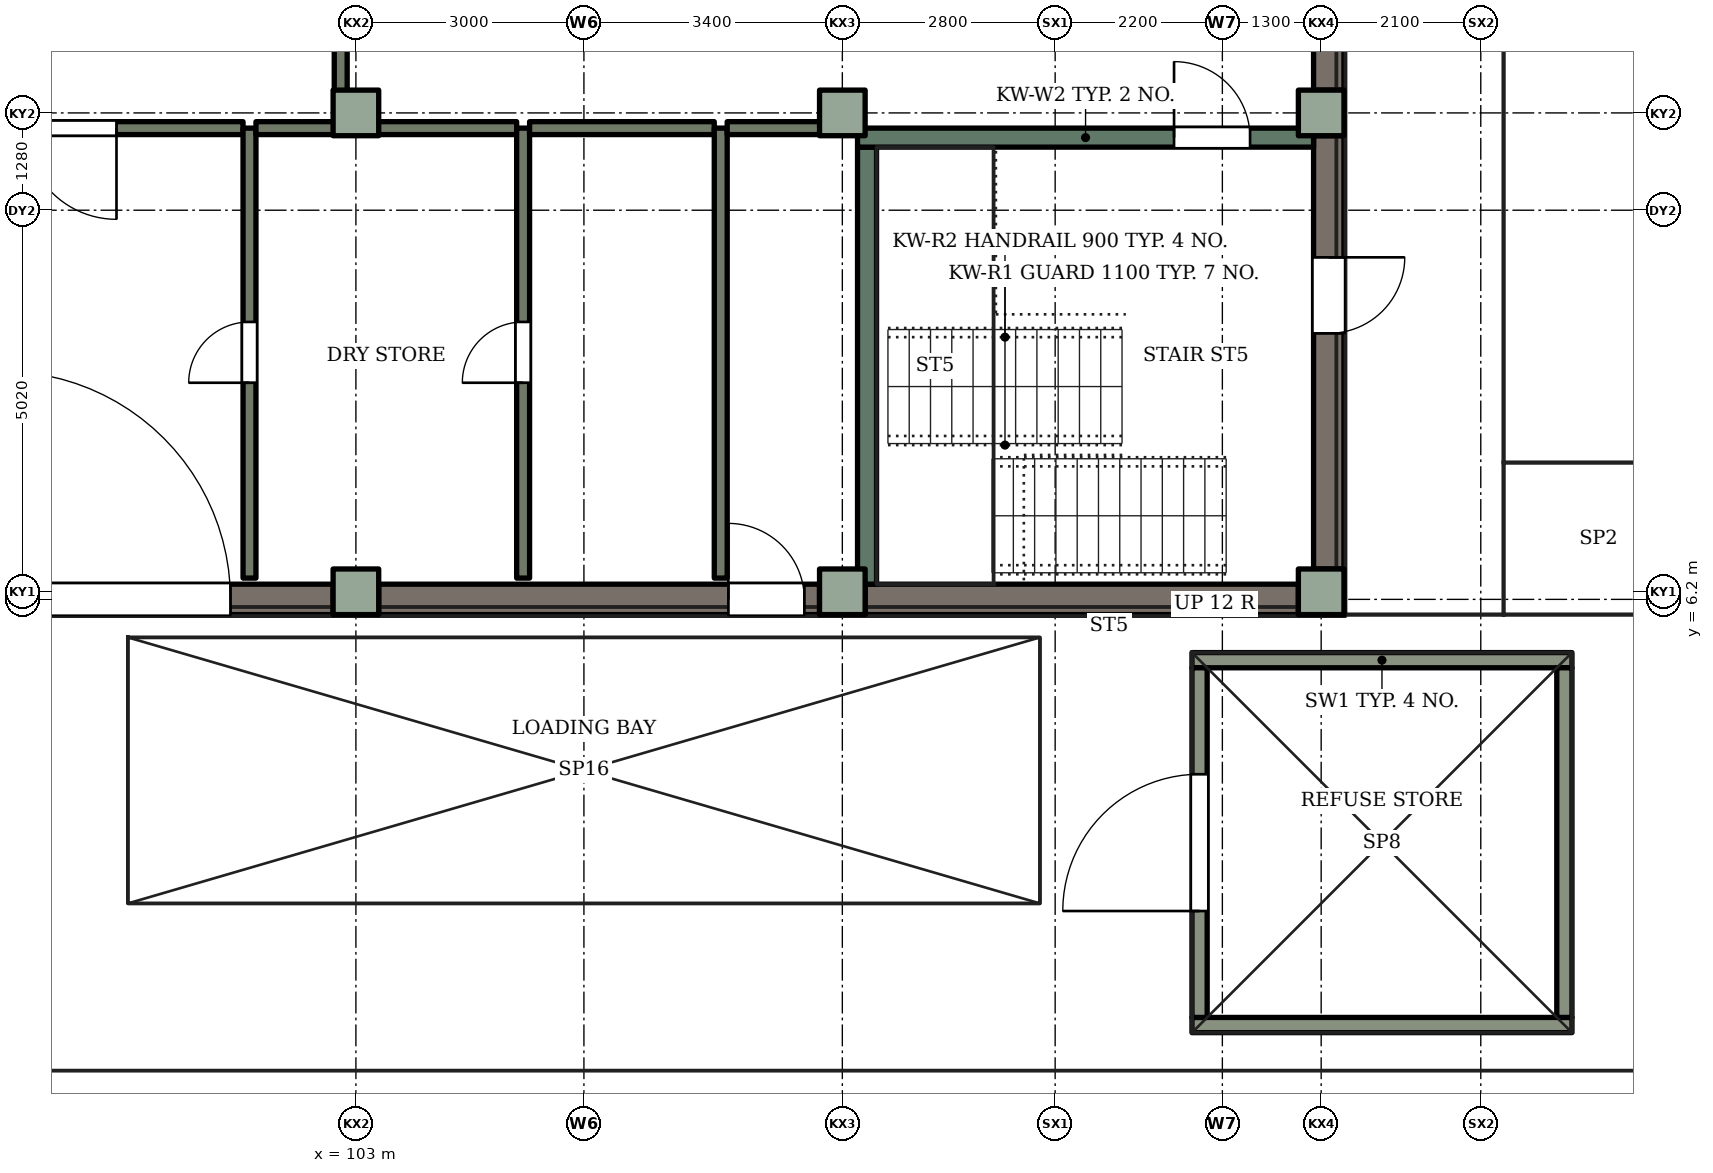
"""IFC4 building model, lengths in metres.
Left out: names, types, materials, properties, quantities, classifications, styles, units other than length and angle.
Written with IfcOpenShell. Run it as: python <this file> out.ifc"""

import sys

from ifc_helpers import new_model, si_unit, direction, frame, frame_2d, origin, origin_2d, place, context, subcontext, project, spatial, rectangle, extrude, element, fill, save


model = new_model("IFC4")
c1 = context("Model", 3, precision=1e-05, world=origin(), true_north=direction((0.0, 1.0)))
c2 = subcontext(c1, "Body", "Model", "MODEL_VIEW")
j1 = project(units=[si_unit("LENGTHUNIT", "METRE"), si_unit("PLANEANGLEUNIT", "RADIAN")], contexts=[c1])
p1 = place(None, origin())
s1 = spatial("IfcSite", under=j1, at=p1, CompositionType="ELEMENT")
p2 = place(p1, origin())
s2 = spatial("IfcBuilding", under=s1, at=p2, CompositionType="ELEMENT")
p3 = place(p2, origin())
s3 = spatial("IfcBuildingStorey", under=s2, at=p3, CompositionType="ELEMENT", Elevation=0.0)
for number, where, z_axis, x_axis in (
    (1, (103.0, 6.3, 0.0), (0.0, 0.0, 1.0), (1.0, 0.0, 0.0)),
    (2, (103.0, 12.6, 0.0), (0.0, 0.0, 1.0), (1.0, 0.0, 0.0)),
    (3, (109.4, 6.3, 0.0), (0.0, 0.0, 1.0), (1.0, 0.0, 0.0)),
    (4, (109.4, 12.6, 0.0), (0.0, 0.0, 1.0), (1.0, 0.0, 0.0)),
    (5, (115.7, 6.3, 0.0), (0.0, 0.0, 1.0), (1.0, 0.0, 0.0)),
    (6, (115.7, 12.6, 0.0), (0.0, 0.0, 1.0), (1.0, 0.0, 0.0)),
):
    element("IfcColumn", number, at=place(p3, frame(where, z_axis=z_axis, x_axis=x_axis)), inside=s3, PredefinedType="COLUMN", context=c2, shape_type="SweptSolid", body=[
        extrude(rectangle(XDim=0.6, YDim=0.6, at=origin_2d()), origin(), (0.0, 0.0, 1.0), 4.2),
    ])
p4 = place(p3, frame((97.0, 6.2, 0.0), z_axis=(0.0, 0.0, 1.0), x_axis=(1.0, 0.0, 0.0)))
e7 = element("IfcWall", 7, at=p4, inside=s3, PredefinedType="SOLIDWALL", context=c2, shape_type="SweptSolid", body=[
    extrude(rectangle(XDim=5.7, YDim=0.4, at=frame_2d((2.85, 0.0))), origin(), (0.0, 0.0, 1.0), 4.2),
])
p5 = place(p4, frame((1.35, 0.0, 0.0)))
e8 = element("IfcOpeningElement", 8, at=p5, cuts=e7, PredefinedType="OPENING", context=c2, shape_type="SweptSolid", body=[
    extrude(rectangle(XDim=3.0, YDim=3.0, at=frame_2d((1.5, 1.5))), frame((0.0, 0.21, 0.0), z_axis=(0.0, -1.0, 0.0), x_axis=(1.0, 0.0, 0.0)), (0.0, 0.0, 1.0), 0.42),
])
p6 = place(p3, frame((103.3, 6.2, 0.0), z_axis=(0.0, 0.0, 1.0), x_axis=(1.0, 0.0, 0.0)))
e9 = element("IfcWall", 9, at=p6, inside=s3, PredefinedType="SOLIDWALL", context=c2, shape_type="SweptSolid", body=[
    extrude(rectangle(XDim=5.8, YDim=0.4, at=frame_2d((2.9, 0.0))), origin(), (0.0, 0.0, 1.0), 4.2),
])
p7 = place(p6, frame((4.6, 0.0, 0.0)))
e10 = element("IfcOpeningElement", 10, at=p7, cuts=e9, PredefinedType="OPENING", context=c2, shape_type="SweptSolid", body=[
    extrude(rectangle(XDim=1.0, YDim=2.1, at=frame_2d((0.5, 1.05))), frame((0.0, 0.21, 0.0), z_axis=(0.0, -1.0, 0.0), x_axis=(1.0, 0.0, 0.0)), (0.0, 0.0, 1.0), 0.42),
])
p8 = place(p3, frame((109.7, 6.2, 0.0), z_axis=(0.0, 0.0, 1.0), x_axis=(1.0, 0.0, 0.0)))
e11 = element("IfcWall", 11, at=p8, inside=s3, PredefinedType="SOLIDWALL", context=c2, shape_type="SweptSolid", body=[
    extrude(rectangle(XDim=5.7, YDim=0.4, at=frame_2d((2.85, 0.0))), origin(), (0.0, 0.0, 1.0), 4.2),
])
p9 = place(p3, frame((115.8, 12.3, 0.0), z_axis=(0.0, 0.0, 1.0), x_axis=(0.0, -1.0, 0.0)))
e12 = element("IfcWall", 12, at=p9, inside=s3, PredefinedType="SOLIDWALL", context=c2, shape_type="SweptSolid", body=[
    extrude(rectangle(XDim=5.7, YDim=0.4, at=frame_2d((2.85, 0.0))), origin(), (0.0, 0.0, 1.0), 4.2),
])
p10 = place(p9, frame((1.6, 0.0, 0.0)))
e13 = element("IfcOpeningElement", 13, at=p10, cuts=e12, PredefinedType="OPENING", context=c2, shape_type="SweptSolid", body=[
    extrude(rectangle(XDim=1.0, YDim=2.4, at=frame_2d((0.5, 1.2))), frame((0.0, 0.21, 0.0), z_axis=(0.0, -1.0, 0.0), x_axis=(1.0, 0.0, 0.0)), (0.0, 0.0, 1.0), 0.42),
])
p11 = place(p3, frame((115.8, 18.7, 0.0), z_axis=(0.0, 0.0, 1.0), x_axis=(0.0, -1.0, 0.0)))
e14 = element("IfcWall", 14, at=p11, inside=s3, PredefinedType="SOLIDWALL", context=c2, shape_type="SweptSolid", body=[
    extrude(rectangle(XDim=5.8, YDim=0.4, at=frame_2d((2.9, 0.0))), origin(), (0.0, 0.0, 1.0), 4.2),
])
p12 = place(p11, frame((1.7, 0.0, 1.5)))
e15 = element("IfcOpeningElement", 15, at=p12, cuts=e14, PredefinedType="OPENING", context=c2, shape_type="SweptSolid", body=[
    extrude(rectangle(XDim=2.4, YDim=1.2, at=frame_2d((1.2, 0.6))), frame((0.0, 0.21, 0.0), z_axis=(0.0, -1.0, 0.0), x_axis=(1.0, 0.0, 0.0)), (0.0, 0.0, 1.0), 0.42),
])
p13 = place(p3, frame((109.725, 6.4, 0.0), z_axis=(0.0, 0.0, 1.0), x_axis=(0.0, 1.0, 0.0)))
e16 = element("IfcWall", 16, at=p13, inside=s3, PredefinedType="SHEAR", context=c2, shape_type="SweptSolid", body=[
    extrude(rectangle(XDim=5.75, YDim=0.25, at=frame_2d((2.875, 0.0))), origin(), (0.0, 0.0, 1.0), 4.2),
])
p14 = place(p3, frame((109.6, 12.275, 0.0), z_axis=(0.0, 0.0, 1.0), x_axis=(1.0, 0.0, 0.0)))
e17 = element("IfcWall", 17, at=p14, inside=s3, PredefinedType="SHEAR", context=c2, shape_type="SweptSolid", body=[
    extrude(rectangle(XDim=6.0, YDim=0.25, at=frame_2d((3.0, 0.0))), origin(), (0.0, 0.0, 1.0), 4.2),
])
p15 = place(p14, frame((4.164, 0.0, 0.0)))
e18 = element("IfcOpeningElement", 18, at=p15, cuts=e17, PredefinedType="OPENING", context=c2, shape_type="SweptSolid", body=[
    extrude(rectangle(XDim=1.0, YDim=2.1, at=frame_2d((0.5, 1.05))), frame((0.0, 0.135, 0.0), z_axis=(0.0, -1.0, 0.0), x_axis=(1.0, 0.0, 0.0)), (0.0, 0.0, 1.0), 0.27),
])
for number, where, z_axis, x_axis in (
    (19, (114.0, 0.6, 0.0), (0.0, 0.0, 1.0), (1.0, 0.0, 0.0)),
    (20, (114.0, 5.4, 0.0), (0.0, 0.0, 1.0), (1.0, 0.0, 0.0)),
):
    element("IfcWall", number, at=place(p3, frame(where, z_axis=z_axis, x_axis=x_axis)), inside=s3, PredefinedType="SOLIDWALL", context=c2, shape_type="SweptSolid", body=[
        extrude(rectangle(XDim=5.0, YDim=0.2, at=frame_2d((2.5, 0.0))), origin(), (0.0, 0.0, 1.0), 2.4),
    ])
p16 = place(p3, frame((114.1, 0.7, 0.0), z_axis=(0.0, 0.0, 1.0), x_axis=(0.0, 1.0, 0.0)))
e21 = element("IfcWall", 21, at=p16, inside=s3, PredefinedType="SOLIDWALL", context=c2, shape_type="SweptSolid", body=[
    extrude(rectangle(XDim=4.6, YDim=0.2, at=frame_2d((2.3, 0.0))), origin(), (0.0, 0.0, 1.0), 2.4),
])
p17 = place(p16, frame((1.4, 0.0, 0.0)))
e22 = element("IfcOpeningElement", 22, at=p17, cuts=e21, PredefinedType="OPENING", context=c2, shape_type="SweptSolid", body=[
    extrude(rectangle(XDim=1.8, YDim=2.1, at=frame_2d((0.9, 1.05))), frame((0.0, 0.11, 0.0), z_axis=(0.0, -1.0, 0.0), x_axis=(1.0, 0.0, 0.0)), (0.0, 0.0, 1.0), 0.22),
])
p18 = place(p3, frame((118.9, 0.7, 0.0), z_axis=(0.0, 0.0, 1.0), x_axis=(0.0, 1.0, 0.0)))
e23 = element("IfcWall", 23, at=p18, inside=s3, PredefinedType="SOLIDWALL", context=c2, shape_type="SweptSolid", body=[
    extrude(rectangle(XDim=4.6, YDim=0.2, at=frame_2d((2.3, 0.0))), origin(), (0.0, 0.0, 1.0), 2.4),
])
p19 = place(p3, frame((101.515, 12.4, 0.0), z_axis=(0.0, 0.0, 1.0), x_axis=(-1.0, 0.0, 0.0)))
e24 = element("IfcWall", 24, at=p19, inside=s3, PredefinedType="PARTITIONING", context=c2, shape_type="SweptSolid", body=[
    extrude(rectangle(XDim=4.63, YDim=0.17, at=frame_2d((2.315, 0.0))), origin(), (0.0, 0.0, 1.0), 3.92),
])
p20 = place(p19, frame((1.665, 0.0, 0.0)))
e25 = element("IfcOpeningElement", 25, at=p20, cuts=e24, PredefinedType="OPENING", context=c2, shape_type="SweptSolid", body=[
    extrude(rectangle(XDim=1.2, YDim=2.1, at=frame_2d((0.6, 1.05))), frame((0.0, 0.095, 0.0), z_axis=(0.0, -1.0, 0.0), x_axis=(1.0, 0.0, 0.0)), (0.0, 0.0, 1.0), 0.19),
])
p21 = place(p3, frame((101.6, 6.48, 0.0), z_axis=(0.0, 0.0, 1.0), x_axis=(0.0, 1.0, 0.0)))
e26 = element("IfcWall", 26, at=p21, inside=s3, PredefinedType="PARTITIONING", context=c2, shape_type="SweptSolid", body=[
    extrude(rectangle(XDim=5.92, YDim=0.17, at=frame_2d((2.96, 0.0))), origin(), (0.0, 0.0, 1.0), 3.92),
])
p22 = place(p21, frame((2.57, 0.0, 0.0)))
e27 = element("IfcOpeningElement", 27, at=p22, cuts=e26, PredefinedType="OPENING", context=c2, shape_type="SweptSolid", body=[
    extrude(rectangle(XDim=0.8, YDim=2.1, at=frame_2d((0.4, 1.05))), frame((0.0, 0.095, 0.0), z_axis=(0.0, -1.0, 0.0), x_axis=(1.0, 0.0, 0.0)), (0.0, 0.0, 1.0), 0.19),
])
p23 = place(p3, frame((102.78, 6.4, 0.0), z_axis=(0.0, 0.0, 1.0), x_axis=(1.0, 0.0, 0.0)))
e28 = element("IfcWall", 28, at=p23, inside=s3, PredefinedType="PARTITIONING", context=c2, shape_type="SweptSolid", body=[
    extrude(rectangle(XDim=0.44, YDim=0.17, at=frame_2d((0.22, 0.0))), origin(), (0.0, 0.0, 1.0), 3.92),
])
p24 = place(p3, frame((102.8, 12.4, 0.0), z_axis=(0.0, 0.0, 1.0), x_axis=(-1.0, 0.0, 0.0)))
e29 = element("IfcWall", 29, at=p24, inside=s3, PredefinedType="PARTITIONING", context=c2, shape_type="SweptSolid", body=[
    extrude(rectangle(XDim=1.115, YDim=0.17, at=frame_2d((0.558, 0.0))), origin(), (0.0, 0.0, 1.0), 3.92),
])
p25 = place(p3, frame((102.8, 12.485, 0.0), z_axis=(0.0, 0.0, 1.0), x_axis=(0.0, 1.0, 0.0)))
e30 = element("IfcWall", 30, at=p25, inside=s3, PredefinedType="PARTITIONING", context=c2, shape_type="SweptSolid", body=[
    extrude(rectangle(XDim=8.915, YDim=0.17, at=frame_2d((4.458, 0.0))), origin(), (0.0, 0.0, 1.0), 3.92),
])
p26 = place(p25, frame((3.865, 0.0, 0.0)))
e31 = element("IfcOpeningElement", 31, at=p26, cuts=e30, PredefinedType="OPENING", context=c2, shape_type="SweptSolid", body=[
    extrude(rectangle(XDim=1.2, YDim=2.1, at=frame_2d((0.6, 1.05))), frame((0.0, 0.095, 0.0), z_axis=(0.0, -1.0, 0.0), x_axis=(1.0, 0.0, 0.0)), (0.0, 0.0, 1.0), 0.19),
])
p27 = place(p3, frame((105.115, 12.4, 0.0), z_axis=(0.0, 0.0, 1.0), x_axis=(-1.0, 0.0, 0.0)))
e32 = element("IfcWall", 32, at=p27, inside=s3, PredefinedType="PARTITIONING", context=c2, shape_type="SweptSolid", body=[
    extrude(rectangle(XDim=2.23, YDim=0.17, at=frame_2d((1.115, 0.0))), origin(), (0.0, 0.0, 1.0), 3.92),
])
p28 = place(p3, frame((105.2, 6.48, 0.0), z_axis=(0.0, 0.0, 1.0), x_axis=(0.0, 1.0, 0.0)))
e33 = element("IfcWall", 33, at=p28, inside=s3, PredefinedType="PARTITIONING", context=c2, shape_type="SweptSolid", body=[
    extrude(rectangle(XDim=5.92, YDim=0.17, at=frame_2d((2.96, 0.0))), origin(), (0.0, 0.0, 1.0), 3.92),
])
p29 = place(p28, frame((2.57, 0.0, 0.0)))
e34 = element("IfcOpeningElement", 34, at=p29, cuts=e33, PredefinedType="OPENING", context=c2, shape_type="SweptSolid", body=[
    extrude(rectangle(XDim=0.8, YDim=2.1, at=frame_2d((0.4, 1.05))), frame((0.0, 0.095, 0.0), z_axis=(0.0, -1.0, 0.0), x_axis=(1.0, 0.0, 0.0)), (0.0, 0.0, 1.0), 0.19),
])
p30 = place(p3, frame((107.715, 12.4, 0.0), z_axis=(0.0, 0.0, 1.0), x_axis=(-1.0, 0.0, 0.0)))
e35 = element("IfcWall", 35, at=p30, inside=s3, PredefinedType="PARTITIONING", context=c2, shape_type="SweptSolid", body=[
    extrude(rectangle(XDim=2.43, YDim=0.17, at=frame_2d((1.215, 0.0))), origin(), (0.0, 0.0, 1.0), 3.92),
])
p31 = place(p3, frame((107.8, 6.48, 0.0), z_axis=(0.0, 0.0, 1.0), x_axis=(0.0, 1.0, 0.0)))
e36 = element("IfcWall", 36, at=p31, inside=s3, PredefinedType="PARTITIONING", context=c2, shape_type="SweptSolid", body=[
    extrude(rectangle(XDim=5.92, YDim=0.17, at=frame_2d((2.96, 0.0))), origin(), (0.0, 0.0, 1.0), 3.92),
])
p32 = place(p3, frame((109.18, 6.4, 0.0), z_axis=(0.0, 0.0, 1.0), x_axis=(1.0, 0.0, 0.0)))
e37 = element("IfcWall", 37, at=p32, inside=s3, PredefinedType="PARTITIONING", context=c2, shape_type="SweptSolid", body=[
    extrude(rectangle(XDim=0.34, YDim=0.17, at=frame_2d((0.17, 0.0))), origin(), (0.0, 0.0, 1.0), 3.92),
])
p33 = place(p3, frame((109.52, 12.4, 0.0), z_axis=(0.0, 0.0, 1.0), x_axis=(-1.0, 0.0, 0.0)))
e38 = element("IfcWall", 38, at=p33, inside=s3, PredefinedType="PARTITIONING", context=c2, shape_type="SweptSolid", body=[
    extrude(rectangle(XDim=1.635, YDim=0.17, at=frame_2d((0.817, 0.0))), origin(), (0.0, 0.0, 1.0), 3.92),
])
p34 = place(p3, frame((115.6, 12.48, 0.0), z_axis=(0.0, 0.0, 1.0), x_axis=(0.0, 1.0, 0.0)))
e39 = element("IfcWall", 39, at=p34, inside=s3, PredefinedType="PARTITIONING", context=c2, shape_type="SweptSolid", body=[
    extrude(rectangle(XDim=0.34, YDim=0.17, at=frame_2d((0.17, 0.0))), origin(), (0.0, 0.0, 1.0), 3.92),
])
p35 = place(p5, origin())
e40 = element("IfcDoor", 40, at=p35, inside=s3, OperationType="ROLLINGUP", PredefinedType="DOOR", context=c2, shape_type="SweptSolid", body=[
    extrude(rectangle(XDim=3.0, YDim=3.0, at=frame_2d((1.5, 1.5))), frame((0.0, 0.025, 0.0), z_axis=(0.0, -1.0, 0.0), x_axis=(1.0, 0.0, 0.0)), (0.0, 0.0, 1.0), 0.05),
])
fill(e8, e40)
p36 = place(p10, origin())
e41 = element("IfcDoor", 41, at=p36, inside=s3, OperationType="SINGLE_SWING_LEFT", PredefinedType="DOOR", context=c2, shape_type="SweptSolid", body=[
    extrude(rectangle(XDim=1.0, YDim=2.4, at=frame_2d((0.5, 1.2))), frame((0.0, 0.025, 0.0), z_axis=(0.0, -1.0, 0.0), x_axis=(1.0, 0.0, 0.0)), (0.0, 0.0, 1.0), 0.05),
])
fill(e13, e41)
p37 = place(p7, origin())
e42 = element("IfcDoor", 42, at=p37, inside=s3, OperationType="SINGLE_SWING_LEFT", PredefinedType="DOOR", context=c2, shape_type="SweptSolid", body=[
    extrude(rectangle(XDim=1.0, YDim=2.1, at=frame_2d((0.5, 1.05))), frame((0.0, 0.025, 0.0), z_axis=(0.0, -1.0, 0.0), x_axis=(1.0, 0.0, 0.0)), (0.0, 0.0, 1.0), 0.05),
])
fill(e10, e42)
p38 = place(p20, origin())
e43 = element("IfcDoor", 43, at=p38, inside=s3, OperationType="SINGLE_SWING_LEFT", PredefinedType="DOOR", context=c2, shape_type="SweptSolid", body=[
    extrude(rectangle(XDim=1.2, YDim=2.1, at=frame_2d((0.6, 1.05))), frame((0.0, 0.025, 0.0), z_axis=(0.0, -1.0, 0.0), x_axis=(1.0, 0.0, 0.0)), (0.0, 0.0, 1.0), 0.05),
])
fill(e25, e43)
p39 = place(p22, origin())
e44 = element("IfcDoor", 44, at=p39, inside=s3, OperationType="SINGLE_SWING_LEFT", PredefinedType="DOOR", context=c2, shape_type="SweptSolid", body=[
    extrude(rectangle(XDim=0.8, YDim=2.1, at=frame_2d((0.4, 1.05))), frame((0.0, 0.025, 0.0), z_axis=(0.0, -1.0, 0.0), x_axis=(1.0, 0.0, 0.0)), (0.0, 0.0, 1.0), 0.05),
])
fill(e27, e44)
p40 = place(p29, origin())
e45 = element("IfcDoor", 45, at=p40, inside=s3, OperationType="SINGLE_SWING_LEFT", PredefinedType="DOOR", context=c2, shape_type="SweptSolid", body=[
    extrude(rectangle(XDim=0.8, YDim=2.1, at=frame_2d((0.4, 1.05))), frame((0.0, 0.025, 0.0), z_axis=(0.0, -1.0, 0.0), x_axis=(1.0, 0.0, 0.0)), (0.0, 0.0, 1.0), 0.05),
])
fill(e34, e45)
p41 = place(p15, origin())
e46 = element("IfcDoor", 46, at=p41, inside=s3, OperationType="SINGLE_SWING_LEFT", PredefinedType="DOOR", context=c2, shape_type="SweptSolid", body=[
    extrude(rectangle(XDim=1.0, YDim=2.1, at=frame_2d((0.5, 1.05))), frame((0.0, 0.025, 0.0), z_axis=(0.0, -1.0, 0.0), x_axis=(1.0, 0.0, 0.0)), (0.0, 0.0, 1.0), 0.05),
])
fill(e18, e46)
p42 = place(p17, origin())
e47 = element("IfcDoor", 47, at=p42, inside=s3, OperationType="DOUBLE_DOOR_SINGLE_SWING", PredefinedType="GATE", context=c2, shape_type="SweptSolid", body=[
    extrude(rectangle(XDim=1.8, YDim=2.1, at=frame_2d((0.9, 1.05))), frame((0.0, 0.025, 0.0), z_axis=(0.0, -1.0, 0.0), x_axis=(1.0, 0.0, 0.0)), (0.0, 0.0, 1.0), 0.05),
])
fill(e22, e47)
save(model, sys.argv[1])
